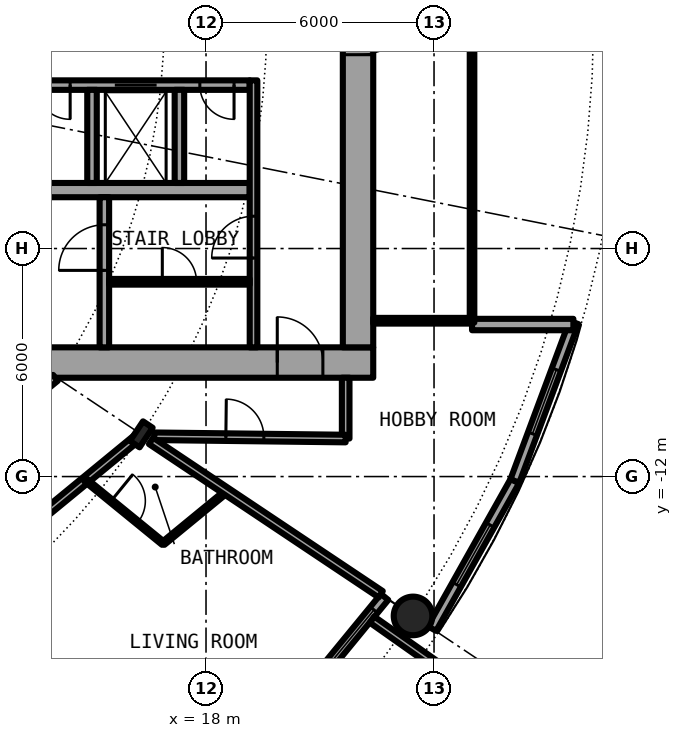
"""IFC4 building model, lengths in metres.
Left out: names, types, materials, properties, quantities, classifications, styles, units other than length and angle.
Written with IfcOpenShell. Run it as: python <this file> out.ifc"""

import sys

from ifc_helpers import new_model, si_unit, direction, frame, frame_2d, origin, origin_2d, place, context, subcontext, project, spatial, rectangle, hollow_circle, i_section, extrude, element, fill, save


model = new_model("IFC4")
c1 = context("Model", 3, precision=1e-05, world=origin(), true_north=direction((0.0, 1.0)))
c2 = subcontext(c1, "Body", "Model", "MODEL_VIEW")
j1 = project(units=[si_unit("LENGTHUNIT", "METRE"), si_unit("PLANEANGLEUNIT", "RADIAN")], contexts=[c1])
p1 = place(None, origin())
s1 = spatial("IfcSite", under=j1, at=p1, CompositionType="ELEMENT")
p2 = place(p1, origin())
s2 = spatial("IfcBuilding", under=s1, at=p2, CompositionType="ELEMENT")
p3 = place(p2, frame((0.0, 0.0, 35.0)))
s3 = spatial("IfcBuildingStorey", under=s2, at=p3, CompositionType="ELEMENT", Elevation=35.0)
p4 = place(p3, frame((23.448, -15.667, 0.0), z_axis=(0.0, 0.0, 1.0), x_axis=(1.0, 0.0, 0.0)))
e1 = element("IfcColumn", 1, at=p4, inside=s3, PredefinedType="COLUMN", context=c2, shape_type="SweptSolid", body=[
    extrude(hollow_circle(Radius=0.508, WallThickness=0.05, at=origin_2d()), origin(), (0.0, 0.0, 1.0), 3.05),
])
p5 = place(p3, frame((16.297, -10.889, 0.0), z_axis=(0.0, 0.0, 1.0), x_axis=(0.831469612303, -0.55557023302, 0.0)))
e2 = element("IfcColumn", 2, at=p5, inside=s3, PredefinedType="COLUMN", context=c2, shape_type="SweptSolid", body=[
    extrude(i_section(OverallWidth=0.305, OverallDepth=0.62, WebThickness=0.021, FlangeThickness=0.04, FilletRadius=0.027, at=origin_2d()), origin(), (0.0, 0.0, 1.0), 3.05),
])
p6 = place(p3, frame((19.304, -19.304, 0.0), z_axis=(0.0, 0.0, 1.0), x_axis=(0.634382322723, 0.773019449054, 0.0)))
e3 = element("IfcWall", 3, at=p6, inside=s3, PredefinedType="SOLIDWALL", context=c2, shape_type="SweptSolid", body=[
    extrude(rectangle(XDim=5.352, YDim=0.25, at=frame_2d((2.676, 0.0))), origin(), (0.0, 0.0, 1.0), 2.7),
])
p7 = place(p6, frame((0.841, 0.0, 0.0)))
e4 = element("IfcOpeningElement", 4, at=p7, cuts=e3, PredefinedType="OPENING", context=c2, shape_type="SweptSolid", body=[
    extrude(rectangle(XDim=1.0, YDim=2.2, at=frame_2d((0.5, 1.1))), frame((0.0, 0.135, 0.0), z_axis=(0.0, -1.0, 0.0), x_axis=(1.0, 0.0, 0.0)), (0.0, 0.0, 1.0), 0.27),
])
p8 = place(p6, frame((3.111, 0.0, 0.3)))
e5 = element("IfcOpeningElement", 5, at=p8, cuts=e3, PredefinedType="OPENING", context=c2, shape_type="SweptSolid", body=[
    extrude(rectangle(XDim=1.8, YDim=2.1, at=frame_2d((0.9, 1.05))), frame((0.0, 0.135, 0.0), z_axis=(0.0, -1.0, 0.0), x_axis=(1.0, 0.0, 0.0)), (0.0, 0.0, 1.0), 0.27),
])
p9 = place(p3, frame((22.37, -15.765, -0.03), z_axis=(0.0, 0.0, 1.0), x_axis=(0.817256123454, -0.576274612209, 0.0)))
e6 = element("IfcWall", 6, at=p9, inside=s3, PredefinedType="SOLIDWALL", context=c2, shape_type="SweptSolid", body=[
    extrude(rectangle(XDim=2.933, YDim=0.2, at=frame_2d((1.466, 0.0))), origin(), (0.0, 0.0, 1.0), 2.73),
])
p10 = place(p3, frame((23.946, -16.0, 0.0), z_axis=(0.0, 0.0, 1.0), x_axis=(0.489696356642, 0.871893042919, 0.0)))
e7 = element("IfcWall", 7, at=p10, inside=s3, PredefinedType="SOLIDWALL", context=c2, shape_type="SweptSolid", body=[
    extrude(rectangle(XDim=4.454, YDim=0.25, at=frame_2d((2.227, 0.0))), origin(), (0.0, 0.0, 1.0), 2.7),
])
p11 = place(p10, frame((1.327, 0.0, 0.3)))
e8 = element("IfcOpeningElement", 8, at=p11, cuts=e7, PredefinedType="OPENING", context=c2, shape_type="SweptSolid", body=[
    extrude(rectangle(XDim=1.8, YDim=2.1, at=frame_2d((0.9, 1.05))), frame((0.0, 0.135, 0.0), z_axis=(0.0, -1.0, 0.0), x_axis=(1.0, 0.0, 0.0)), (0.0, 0.0, 1.0), 0.27),
])
p12 = place(p3, frame((26.127, -12.117, 0.0), z_axis=(0.0, 0.0, 1.0), x_axis=(0.349247811493, 0.937030397675, 0.0)))
e9 = element("IfcWall", 9, at=p12, inside=s3, PredefinedType="SOLIDWALL", context=c2, shape_type="SweptSolid", body=[
    extrude(rectangle(XDim=4.452, YDim=0.25, at=frame_2d((2.226, 0.0))), origin(), (0.0, 0.0, 1.0), 2.7),
])
p13 = place(p12, frame((1.327, 0.0, 0.3)))
e10 = element("IfcOpeningElement", 10, at=p13, cuts=e9, PredefinedType="OPENING", context=c2, shape_type="SweptSolid", body=[
    extrude(rectangle(XDim=1.8, YDim=2.1, at=frame_2d((0.9, 1.05))), frame((0.0, 0.135, 0.0), z_axis=(0.0, -1.0, 0.0), x_axis=(1.0, 0.0, 0.0)), (0.0, 0.0, 1.0), 0.27),
])
p14 = place(p3, frame((25.0, -8.0, 0.0), z_axis=(0.0, 0.0, 1.0), x_axis=(1.0, 0.0, 0.0)))
e11 = element("IfcWall", 11, at=p14, inside=s3, PredefinedType="SOLIDWALL", context=c2, shape_type="SweptSolid", body=[
    extrude(rectangle(XDim=2.667, YDim=0.3, at=frame_2d((1.333, 0.0))), origin(), (0.0, 0.0, 1.0), 2.7),
])
p15 = place(p3, frame((8.2, -9.0, 0.0), z_axis=(0.0, 0.0, 1.0), x_axis=(1.0, 0.0, 0.0)))
e12 = element("IfcWall", 12, at=p15, inside=s3, PredefinedType="SHEAR", context=c2, shape_type="SweptSolid", body=[
    extrude(rectangle(XDim=14.2, YDim=0.8, at=frame_2d((7.1, 0.0))), origin(), (0.0, 0.0, 1.0), 3.05),
])
p16 = place(p15, frame((11.675, 0.0, 0.0)))
e13 = element("IfcOpeningElement", 13, at=p16, cuts=e12, PredefinedType="OPENING", context=c2, shape_type="SweptSolid", body=[
    extrude(rectangle(XDim=1.2, YDim=2.3, at=frame_2d((0.6, 1.15))), frame((0.0, 0.41, 0.0), z_axis=(0.0, -1.0, 0.0), x_axis=(1.0, 0.0, 0.0)), (0.0, 0.0, 1.0), 0.82),
])
p17 = place(p3, frame((22.0, 8.6, 0.0), z_axis=(0.0, 0.0, 1.0), x_axis=(0.0, -1.0, 0.0)))
e14 = element("IfcWall", 14, at=p17, inside=s3, PredefinedType="SHEAR", context=c2, shape_type="SweptSolid", body=[
    extrude(rectangle(XDim=17.2, YDim=0.8, at=frame_2d((8.6, 0.0))), origin(), (0.0, 0.0, 1.0), 3.05),
])
p18 = place(p17, frame((7.7, 0.0, 0.0)))
e15 = element("IfcOpeningElement", 15, at=p18, cuts=e14, PredefinedType="OPENING", context=c2, shape_type="SweptSolid", body=[
    extrude(rectangle(XDim=1.8, YDim=2.3, at=frame_2d((0.9, 1.15))), frame((0.0, 0.41, 0.0), z_axis=(0.0, -1.0, 0.0), x_axis=(1.0, 0.0, 0.0)), (0.0, 0.0, 1.0), 0.82),
])
p19 = place(p3, frame((19.15, -1.7, 0.0), z_axis=(0.0, 0.0, 1.0), x_axis=(-1.0, 0.0, 0.0)))
e16 = element("IfcWall", 16, at=p19, inside=s3, PredefinedType="SHEAR", context=c2, shape_type="SweptSolid", body=[
    extrude(rectangle(XDim=10.15, YDim=0.25, at=frame_2d((5.075, 0.0))), origin(), (0.0, 0.0, 1.0), 3.05),
])
p20 = place(p19, frame((2.45, 0.0, 0.0)))
e17 = element("IfcOpeningElement", 17, at=p20, cuts=e16, PredefinedType="OPENING", context=c2, shape_type="SweptSolid", body=[
    extrude(rectangle(XDim=1.1, YDim=2.3, at=frame_2d((0.55, 1.15))), frame((0.0, 0.135, 0.0), z_axis=(0.0, -1.0, 0.0), x_axis=(1.0, 0.0, 0.0)), (0.0, 0.0, 1.0), 0.27),
])
p21 = place(p19, frame((8.837, 0.0, 0.0)))
e18 = element("IfcOpeningElement", 18, at=p21, cuts=e16, PredefinedType="OPENING", context=c2, shape_type="SweptSolid", body=[
    extrude(rectangle(XDim=0.9, YDim=2.3, at=frame_2d((0.45, 1.15))), frame((0.0, 0.135, 0.0), z_axis=(0.0, -1.0, 0.0), x_axis=(1.0, 0.0, 0.0)), (0.0, 0.0, 1.0), 0.27),
])
p22 = place(p19, frame((6.8, 0.0, 0.0)))
e19 = element("IfcOpeningElement", 19, at=p22, cuts=e16, PredefinedType="OPENING", context=c2, shape_type="SweptSolid", body=[
    extrude(rectangle(XDim=0.9, YDim=2.3, at=frame_2d((0.45, 1.15))), frame((0.0, 0.135, 0.0), z_axis=(0.0, -1.0, 0.0), x_axis=(1.0, 0.0, 0.0)), (0.0, 0.0, 1.0), 0.27),
])
p23 = place(p19, frame((4.725, 0.0, 0.0)))
e20 = element("IfcOpeningElement", 20, at=p23, cuts=e16, PredefinedType="OPENING", context=c2, shape_type="SweptSolid", body=[
    extrude(rectangle(XDim=0.9, YDim=2.3, at=frame_2d((0.45, 1.15))), frame((0.0, 0.135, 0.0), z_axis=(0.0, -1.0, 0.0), x_axis=(1.0, 0.0, 0.0)), (0.0, 0.0, 1.0), 0.27),
])
p24 = place(p19, frame((0.413, 0.0, 0.0)))
e21 = element("IfcOpeningElement", 21, at=p24, cuts=e16, PredefinedType="OPENING", context=c2, shape_type="SweptSolid", body=[
    extrude(rectangle(XDim=0.9, YDim=2.3, at=frame_2d((0.45, 1.15))), frame((0.0, 0.135, 0.0), z_axis=(0.0, -1.0, 0.0), x_axis=(1.0, 0.0, 0.0)), (0.0, 0.0, 1.0), 0.27),
])
p25 = place(p3, frame((9.0, -4.462, 0.0), z_axis=(0.0, 0.0, 1.0), x_axis=(1.0, 0.0, 0.0)))
e22 = element("IfcWall", 22, at=p25, inside=s3, PredefinedType="SHEAR", context=c2, shape_type="SweptSolid", body=[
    extrude(rectangle(XDim=10.15, YDim=0.375, at=frame_2d((5.075, 0.0))), origin(), (0.0, 0.0, 1.0), 3.05),
])
p26 = place(p3, frame((15.325, -8.6, 0.0), z_axis=(0.0, 0.0, 1.0), x_axis=(0.0, 1.0, 0.0)))
e23 = element("IfcWall", 23, at=p26, inside=s3, PredefinedType="SHEAR", context=c2, shape_type="SweptSolid", body=[
    extrude(rectangle(XDim=3.95, YDim=0.25, at=frame_2d((1.975, 0.0))), origin(), (0.0, 0.0, 1.0), 3.05),
])
p27 = place(p26, frame((2.025, 0.0, 0.0)))
e24 = element("IfcOpeningElement", 24, at=p27, cuts=e23, PredefinedType="OPENING", context=c2, shape_type="SweptSolid", body=[
    extrude(rectangle(XDim=1.2, YDim=2.3, at=frame_2d((0.6, 1.15))), frame((0.0, 0.135, 0.0), z_axis=(0.0, -1.0, 0.0), x_axis=(1.0, 0.0, 0.0)), (0.0, 0.0, 1.0), 0.27),
])
for number, where, z_axis, x_axis in (
    (25, (15.0, -1.825, 0.0), (0.0, 0.0, 1.0), (0.0, -1.0, 0.0)),
    (26, (17.3, -1.825, 0.0), (0.0, 0.0, 1.0), (0.0, -1.0, 0.0)),
):
    element("IfcWall", number, at=place(p3, frame(where, z_axis=z_axis, x_axis=x_axis)), inside=s3, PredefinedType="SOLIDWALL", context=c2, shape_type="SweptSolid", body=[
        extrude(rectangle(XDim=2.45, YDim=0.25, at=frame_2d((1.225, 0.0))), origin(), (0.0, 0.0, 1.0), 2.7),
    ])
p28 = place(p3, frame((19.25, -8.6, 0.0), z_axis=(0.0, 0.0, 1.0), x_axis=(0.0, 1.0, 0.0)))
e27 = element("IfcWall", 27, at=p28, inside=s3, PredefinedType="SOLIDWALL", context=c2, shape_type="SweptSolid", body=[
    extrude(rectangle(XDim=7.025, YDim=0.2, at=frame_2d((3.513, 0.0))), origin(), (0.0, 0.0, 1.0), 2.7),
])
p29 = place(p28, frame((2.35, 0.0, 0.0)))
e28 = element("IfcOpeningElement", 28, at=p29, cuts=e27, PredefinedType="OPENING", context=c2, shape_type="SweptSolid", body=[
    extrude(rectangle(XDim=1.1, YDim=2.3, at=frame_2d((0.55, 1.15))), frame((0.0, 0.11, 0.0), z_axis=(0.0, -1.0, 0.0), x_axis=(1.0, 0.0, 0.0)), (0.0, 0.0, 1.0), 0.22),
])
p30 = place(p3, frame((15.45, -6.875, 0.0), z_axis=(0.0, 0.0, 1.0), x_axis=(1.0, 0.0, 0.0)))
e29 = element("IfcWall", 29, at=p30, inside=s3, PredefinedType="PARTITIONING", context=c2, shape_type="SweptSolid", body=[
    extrude(rectangle(XDim=3.7, YDim=0.15, at=frame_2d((1.85, 0.0))), origin(), (0.0, 0.0, 1.0), 2.7),
])
p31 = place(p30, frame((1.4, 0.0, 0.0)))
e30 = element("IfcOpeningElement", 30, at=p31, cuts=e29, PredefinedType="OPENING", context=c2, shape_type="SweptSolid", body=[
    extrude(rectangle(XDim=0.9, YDim=2.3, at=frame_2d((0.45, 1.15))), frame((0.0, 0.085, 0.0), z_axis=(0.0, -1.0, 0.0), x_axis=(1.0, 0.0, 0.0)), (0.0, 0.0, 1.0), 0.17),
])
p32 = place(p3, frame((22.4, -7.9, 0.0), z_axis=(0.0, 0.0, 1.0), x_axis=(1.0, 0.0, 0.0)))
e31 = element("IfcWall", 31, at=p32, inside=s3, PredefinedType="PARTITIONING", context=c2, shape_type="SweptSolid", body=[
    extrude(rectangle(XDim=2.54, YDim=0.15, at=frame_2d((1.27, 0.0))), origin(), (0.0, 0.0, 1.0), 2.7),
])
p33 = place(p3, frame((25.0, -7.95, 0.0), z_axis=(0.0, 0.0, 1.0), x_axis=(0.0, 1.0, 0.0)))
e32 = element("IfcWall", 32, at=p33, inside=s3, PredefinedType="PARTITIONING", context=c2, shape_type="SweptSolid", body=[
    extrude(rectangle(XDim=15.9, YDim=0.12, at=frame_2d((7.95, 0.0))), origin(), (0.0, 0.0, 1.0), 2.7),
])
p34 = place(p33, frame((0.95, 0.0, 0.1)))
e33 = element("IfcOpeningElement", 33, at=p34, cuts=e32, PredefinedType="OPENING", context=c2, shape_type="SweptSolid", body=[
    extrude(rectangle(XDim=14.0, YDim=2.35, at=frame_2d((7.0, 1.175))), frame((0.0, 0.07, 0.0), z_axis=(0.0, -1.0, 0.0), x_axis=(1.0, 0.0, 0.0)), (0.0, 0.0, 1.0), 0.14),
])
p35 = place(p3, frame((21.675, -11.0, 0.0), z_axis=(0.0, 0.0, 1.0), x_axis=(0.0, 1.0, 0.0)))
e34 = element("IfcWall", 34, at=p35, inside=s3, PredefinedType="PARTITIONING", context=c2, shape_type="SweptSolid", body=[
    extrude(rectangle(XDim=1.6, YDim=0.2, at=frame_2d((0.8, 0.0))), origin(), (0.0, 0.0, 1.0), 2.7),
])
p36 = place(p3, frame((16.874, -13.758, 0.0), z_axis=(0.0, 0.0, 1.0), x_axis=(0.772948171844, 0.634469166818, 0.0)))
e35 = element("IfcWall", 35, at=p36, inside=s3, PredefinedType="PARTITIONING", context=c2, shape_type="SweptSolid", body=[
    extrude(rectangle(XDim=2.158, YDim=0.1, at=frame_2d((1.079, 0.0))), origin(), (0.0, 0.0, 1.0), 2.7),
])
p37 = place(p3, frame((7.512, -18.105, 0.0), z_axis=(0.0, 0.0, 1.0), x_axis=(0.772704887747, 0.634765434198, 0.0)))
e36 = element("IfcWall", 36, at=p37, inside=s3, PredefinedType="PARTITIONING", context=c2, shape_type="SweptSolid", body=[
    extrude(rectangle(XDim=11.209, YDim=0.2, at=frame_2d((5.604, 0.0))), origin(), (0.0, 0.0, 1.0), 2.38),
])
p38 = place(p37, frame((7.072, 0.0, 0.0)))
e37 = element("IfcOpeningElement", 37, at=p38, cuts=e36, PredefinedType="OPENING", context=c2, shape_type="SweptSolid", body=[
    extrude(rectangle(XDim=1.0, YDim=2.3, at=frame_2d((0.5, 1.15))), frame((0.0, 0.11, 0.0), z_axis=(0.0, -1.0, 0.0), x_axis=(1.0, 0.0, 0.0)), (0.0, 0.0, 1.0), 0.22),
])
p39 = place(p3, frame((6.467, -15.614, 0.0), z_axis=(0.0, 0.0, 1.0), x_axis=(0.773084654695, 0.634302858794, 0.0)))
e38 = element("IfcWall", 38, at=p39, inside=s3, PredefinedType="PARTITIONING", context=c2, shape_type="SweptSolid", body=[
    extrude(rectangle(XDim=9.793, YDim=0.2, at=frame_2d((4.896, 0.0))), origin(), (0.0, 0.0, 1.0), 2.7),
])
p40 = place(p39, frame((4.407, 0.0, 0.0)))
e39 = element("IfcOpeningElement", 39, at=p40, cuts=e38, PredefinedType="OPENING", context=c2, shape_type="SweptSolid", body=[
    extrude(rectangle(XDim=1.0, YDim=2.3, at=frame_2d((0.5, 1.15))), frame((0.0, 0.11, 0.0), z_axis=(0.0, -1.0, 0.0), x_axis=(1.0, 0.0, 0.0)), (0.0, 0.0, 1.0), 0.22),
])
p41 = place(p3, frame((16.636, -10.94, 0.0), z_axis=(0.0, 0.0, 1.0), x_axis=(0.999928980998, -0.011917758204, 0.0)))
e40 = element("IfcWall", 40, at=p41, inside=s3, PredefinedType="PARTITIONING", context=c2, shape_type="SweptSolid", body=[
    extrude(rectangle(XDim=5.039, YDim=0.2, at=frame_2d((2.52, 0.0))), origin(), (0.0, 0.0, 1.0), 2.7),
])
p42 = place(p41, frame((1.886, 0.0, 0.0)))
e41 = element("IfcOpeningElement", 41, at=p42, cuts=e40, PredefinedType="OPENING", context=c2, shape_type="SweptSolid", body=[
    extrude(rectangle(XDim=1.0, YDim=2.3, at=frame_2d((0.5, 1.15))), frame((0.0, 0.11, 0.0), z_axis=(0.0, -1.0, 0.0), x_axis=(1.0, 0.0, 0.0)), (0.0, 0.0, 1.0), 0.22),
])
p43 = place(p3, frame((11.899, -14.499, 0.0), z_axis=(0.0, 0.0, 1.0), x_axis=(0.634396151441, -0.77300810024, 0.0)))
e42 = element("IfcWall", 42, at=p43, inside=s3, PredefinedType="PARTITIONING", context=c2, shape_type="SweptSolid", body=[
    extrude(rectangle(XDim=8.419, YDim=0.1, at=frame_2d((4.209, 0.0))), origin(), (0.0, 0.0, 1.0), 2.7),
])
p44 = place(p43, frame((0.84, 0.0, 0.0)))
e43 = element("IfcOpeningElement", 43, at=p44, cuts=e42, PredefinedType="OPENING", context=c2, shape_type="SweptSolid", body=[
    extrude(rectangle(XDim=0.9, YDim=2.3, at=frame_2d((0.45, 1.15))), frame((0.0, 0.06, 0.0), z_axis=(0.0, -1.0, 0.0), x_axis=(1.0, 0.0, 0.0)), (0.0, 0.0, 1.0), 0.12),
])
p45 = place(p43, frame((5.051, 0.0, 0.0)))
e44 = element("IfcOpeningElement", 44, at=p45, cuts=e42, PredefinedType="OPENING", context=c2, shape_type="SweptSolid", body=[
    extrude(rectangle(XDim=0.9, YDim=2.3, at=frame_2d((0.45, 1.15))), frame((0.0, 0.06, 0.0), z_axis=(0.0, -1.0, 0.0), x_axis=(1.0, 0.0, 0.0)), (0.0, 0.0, 1.0), 0.12),
])
p46 = place(p3, frame((14.831, -12.092, 0.0), z_axis=(0.0, 0.0, 1.0), x_axis=(0.774979608522, -0.631986239072, 0.0)))
e45 = element("IfcWall", 45, at=p46, inside=s3, PredefinedType="PARTITIONING", context=c2, shape_type="SweptSolid", body=[
    extrude(rectangle(XDim=2.636, YDim=0.1, at=frame_2d((1.318, 0.0))), origin(), (0.0, 0.0, 1.0), 2.7),
])
p47 = place(p46, frame((0.868, 0.0, 0.0)))
e46 = element("IfcOpeningElement", 46, at=p47, cuts=e45, PredefinedType="OPENING", context=c2, shape_type="SweptSolid", body=[
    extrude(rectangle(XDim=0.9, YDim=2.3, at=frame_2d((0.45, 1.15))), frame((0.0, 0.06, 0.0), z_axis=(0.0, -1.0, 0.0), x_axis=(1.0, 0.0, 0.0)), (0.0, 0.0, 1.0), 0.12),
])
p48 = place(p3, frame((16.554, -11.062, 0.0), z_axis=(0.0, 0.0, 1.0), x_axis=(0.831610607528, -0.555359160765, 0.0)))
e47 = element("IfcWall", 47, at=p48, inside=s3, PredefinedType="PARTITIONING", context=c2, shape_type="SweptSolid", body=[
    extrude(rectangle(XDim=7.265, YDim=0.2, at=frame_2d((3.633, 0.0))), origin(), (0.0, 0.0, 1.0), 2.7),
])
p49 = place(p8, origin())
e48 = element("IfcWindow", 48, at=p49, inside=s3, PartitioningType="SINGLE_PANEL", PredefinedType="WINDOW", context=c2, shape_type="SweptSolid", body=[
    extrude(rectangle(XDim=1.8, YDim=2.1, at=frame_2d((0.9, 1.05))), frame((0.0, 0.03, 0.0), z_axis=(0.0, -1.0, 0.0), x_axis=(1.0, 0.0, 0.0)), (0.0, 0.0, 1.0), 0.06),
])
fill(e5, e48)
p50 = place(p11, origin())
e49 = element("IfcWindow", 49, at=p50, inside=s3, PartitioningType="SINGLE_PANEL", PredefinedType="WINDOW", context=c2, shape_type="SweptSolid", body=[
    extrude(rectangle(XDim=1.8, YDim=2.1, at=frame_2d((0.9, 1.05))), frame((0.0, 0.03, 0.0), z_axis=(0.0, -1.0, 0.0), x_axis=(1.0, 0.0, 0.0)), (0.0, 0.0, 1.0), 0.06),
])
fill(e8, e49)
p51 = place(p13, origin())
e50 = element("IfcWindow", 50, at=p51, inside=s3, PartitioningType="SINGLE_PANEL", PredefinedType="WINDOW", context=c2, shape_type="SweptSolid", body=[
    extrude(rectangle(XDim=1.8, YDim=2.1, at=frame_2d((0.9, 1.05))), frame((0.0, 0.03, 0.0), z_axis=(0.0, -1.0, 0.0), x_axis=(1.0, 0.0, 0.0)), (0.0, 0.0, 1.0), 0.06),
])
fill(e10, e50)
p52 = place(p20, origin())
e51 = element("IfcDoor", 51, at=p52, inside=s3, OperationType="DOUBLE_DOOR_SLIDING", PredefinedType="DOOR", context=c2, shape_type="SweptSolid", body=[
    extrude(rectangle(XDim=1.1, YDim=2.3, at=frame_2d((0.55, 1.15))), frame((0.0, 0.025, 0.0), z_axis=(0.0, -1.0, 0.0), x_axis=(1.0, 0.0, 0.0)), (0.0, 0.0, 1.0), 0.05),
])
fill(e17, e51)
p53 = place(p23, origin())
e52 = element("IfcDoor", 52, at=p53, inside=s3, OperationType="SINGLE_SWING_LEFT", PredefinedType="DOOR", context=c2, shape_type="SweptSolid", body=[
    extrude(rectangle(XDim=0.9, YDim=2.3, at=frame_2d((0.45, 1.15))), frame((0.0, 0.025, 0.0), z_axis=(0.0, -1.0, 0.0), x_axis=(1.0, 0.0, 0.0)), (0.0, 0.0, 1.0), 0.05),
])
fill(e20, e52)
p54 = place(p24, origin())
e53 = element("IfcDoor", 53, at=p54, inside=s3, OperationType="SINGLE_SWING_RIGHT", PredefinedType="DOOR", context=c2, shape_type="SweptSolid", body=[
    extrude(rectangle(XDim=0.9, YDim=2.3, at=frame_2d((0.45, 1.15))), frame((0.0, 0.025, 0.0), z_axis=(0.0, -1.0, 0.0), x_axis=(1.0, 0.0, 0.0)), (0.0, 0.0, 1.0), 0.05),
])
fill(e21, e53)
p55 = place(p31, origin())
e54 = element("IfcDoor", 54, at=p55, inside=s3, OperationType="SINGLE_SWING_LEFT", PredefinedType="DOOR", context=c2, shape_type="SweptSolid", body=[
    extrude(rectangle(XDim=0.9, YDim=2.3, at=frame_2d((0.45, 1.15))), frame((0.0, 0.025, 0.0), z_axis=(0.0, -1.0, 0.0), x_axis=(1.0, 0.0, 0.0)), (0.0, 0.0, 1.0), 0.05),
])
fill(e30, e54)
p56 = place(p27, origin())
e55 = element("IfcDoor", 55, at=p56, inside=s3, OperationType="SINGLE_SWING_LEFT", PredefinedType="DOOR", context=c2, shape_type="SweptSolid", body=[
    extrude(rectangle(XDim=1.2, YDim=2.3, at=frame_2d((0.6, 1.15))), frame((0.0, 0.025, 0.0), z_axis=(0.0, -1.0, 0.0), x_axis=(1.0, 0.0, 0.0)), (0.0, 0.0, 1.0), 0.05),
])
fill(e24, e55)
p57 = place(p29, origin())
e56 = element("IfcDoor", 56, at=p57, inside=s3, OperationType="SINGLE_SWING_RIGHT", PredefinedType="DOOR", context=c2, shape_type="SweptSolid", body=[
    extrude(rectangle(XDim=1.1, YDim=2.3, at=frame_2d((0.55, 1.15))), frame((0.0, 0.025, 0.0), z_axis=(0.0, -1.0, 0.0), x_axis=(1.0, 0.0, 0.0)), (0.0, 0.0, 1.0), 0.05),
])
fill(e28, e56)
p58 = place(p16, origin())
e57 = element("IfcDoor", 57, at=p58, inside=s3, OperationType="SINGLE_SWING_LEFT", PredefinedType="DOOR", context=c2, shape_type="SweptSolid", body=[
    extrude(rectangle(XDim=1.2, YDim=2.3, at=frame_2d((0.6, 1.15))), frame((0.0, 0.025, 0.0), z_axis=(0.0, -1.0, 0.0), x_axis=(1.0, 0.0, 0.0)), (0.0, 0.0, 1.0), 0.05),
])
fill(e13, e57)
p59 = place(p18, origin())
e58 = element("IfcDoor", 58, at=p59, inside=s3, OperationType="SINGLE_SWING_LEFT", PredefinedType="DOOR", context=c2, shape_type="SweptSolid", body=[
    extrude(rectangle(XDim=1.8, YDim=2.3, at=frame_2d((0.9, 1.15))), frame((0.0, 0.025, 0.0), z_axis=(0.0, -1.0, 0.0), x_axis=(1.0, 0.0, 0.0)), (0.0, 0.0, 1.0), 0.05),
])
fill(e15, e58)
p60 = place(p34, origin())
e59 = element("IfcWindow", 59, at=p60, inside=s3, PartitioningType="SINGLE_PANEL", PredefinedType="WINDOW", context=c2, shape_type="SweptSolid", body=[
    extrude(rectangle(XDim=14.0, YDim=2.35, at=frame_2d((7.0, 1.175))), frame((0.0, 0.03, 0.0), z_axis=(0.0, -1.0, 0.0), x_axis=(1.0, 0.0, 0.0)), (0.0, 0.0, 1.0), 0.06),
])
fill(e33, e59)
p61 = place(p47, origin())
e60 = element("IfcDoor", 60, at=p61, inside=s3, OperationType="SINGLE_SWING_RIGHT", PredefinedType="DOOR", context=c2, shape_type="SweptSolid", body=[
    extrude(rectangle(XDim=0.9, YDim=2.3, at=frame_2d((0.45, 1.15))), frame((0.0, 0.025, 0.0), z_axis=(0.0, -1.0, 0.0), x_axis=(1.0, 0.0, 0.0)), (0.0, 0.0, 1.0), 0.05),
])
fill(e46, e60)
p62 = place(p42, origin())
e61 = element("IfcDoor", 61, at=p62, inside=s3, OperationType="SINGLE_SWING_LEFT", PredefinedType="DOOR", context=c2, shape_type="SweptSolid", body=[
    extrude(rectangle(XDim=1.0, YDim=2.3, at=frame_2d((0.5, 1.15))), frame((0.0, 0.025, 0.0), z_axis=(0.0, -1.0, 0.0), x_axis=(1.0, 0.0, 0.0)), (0.0, 0.0, 1.0), 0.05),
])
fill(e41, e61)
save(model, sys.argv[1])
